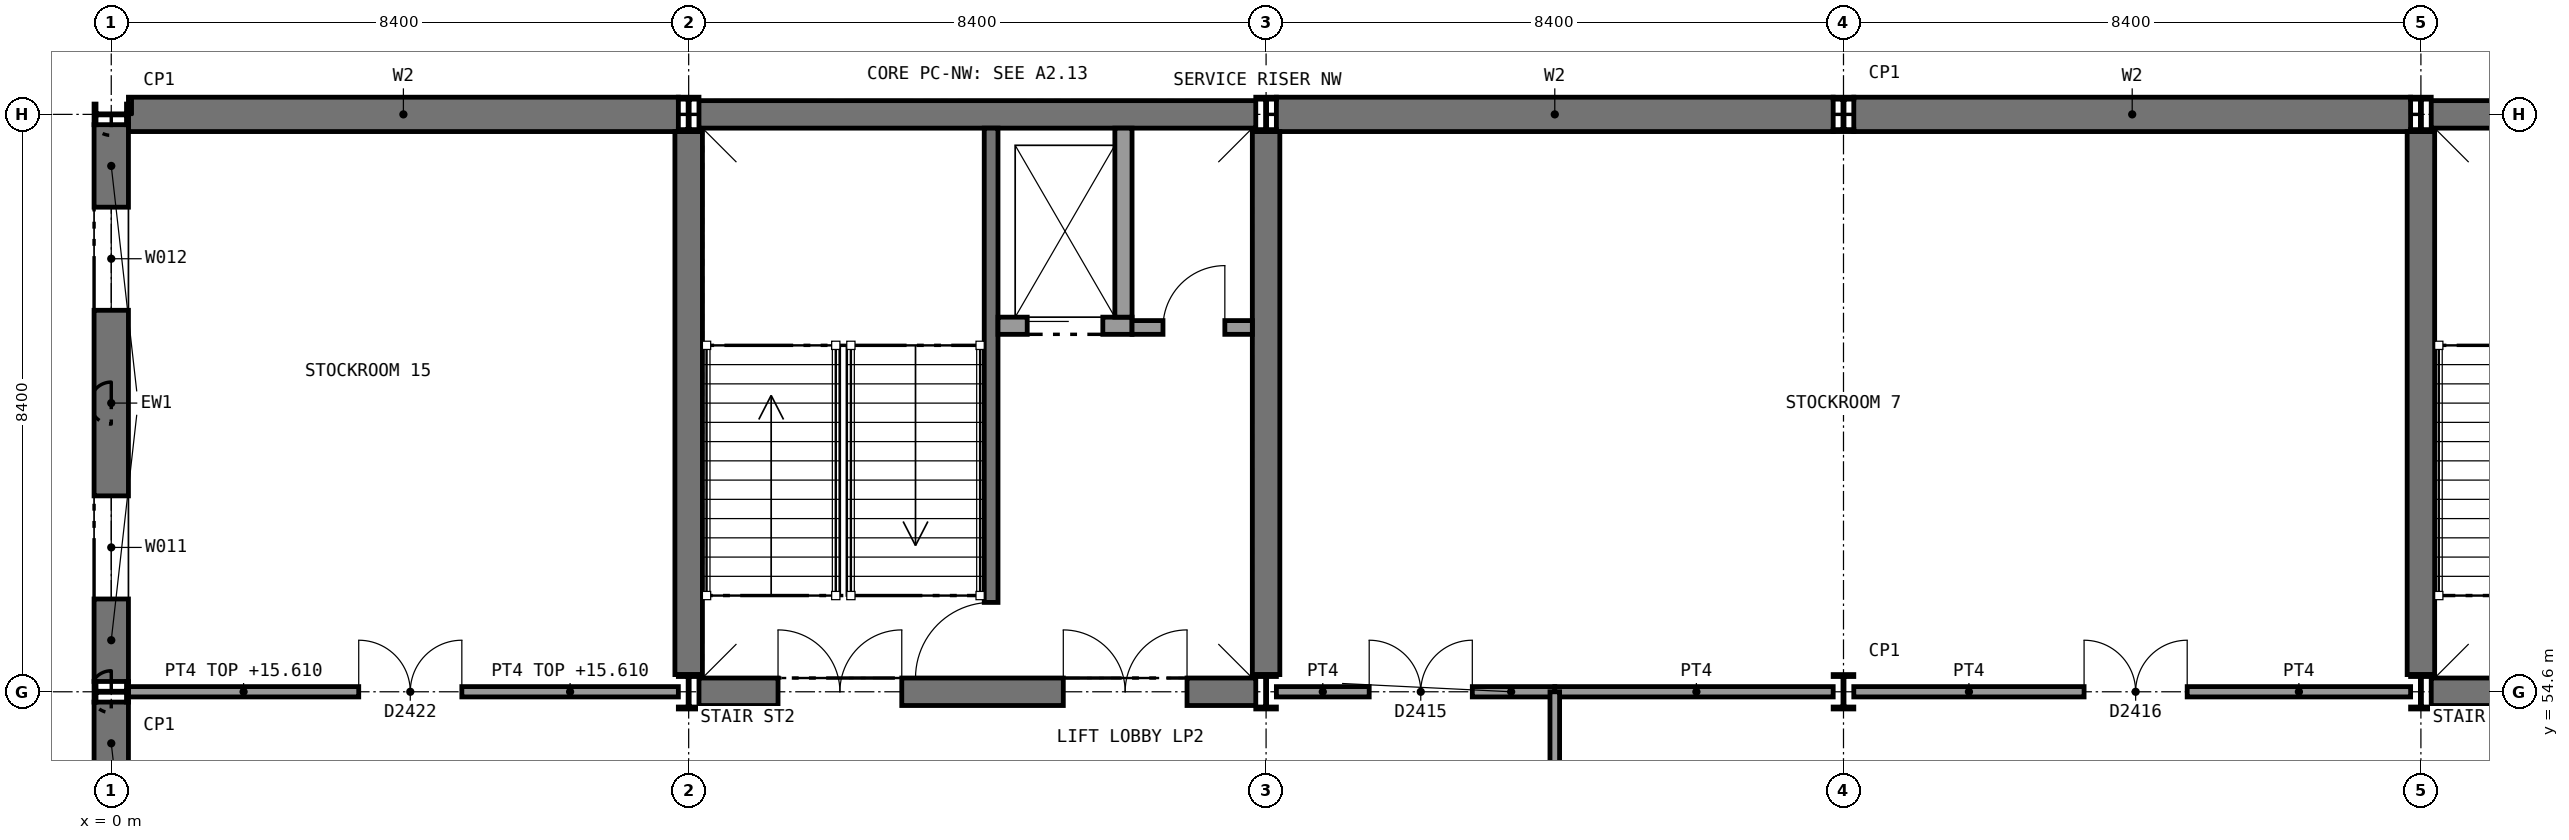
"""IFC4 building model, lengths in metres.
Left out: names, types, materials, properties, quantities, classifications, styles, units other than length and angle.
Written with IfcOpenShell. Run it as: python <this file> out.ifc"""

import sys

from ifc_helpers import new_model, si_unit, direction, frame, frame_2d, origin, origin_2d, place, context, subcontext, project, spatial, rectangle, i_section, extrude, element, fill, save


model = new_model("IFC4")
c1 = context("Model", 3, precision=1e-05, world=origin(), true_north=direction((0.0, 1.0)))
c2 = subcontext(c1, "Body", "Model", "MODEL_VIEW")
j1 = project(units=[si_unit("LENGTHUNIT", "METRE"), si_unit("PLANEANGLEUNIT", "RADIAN")], contexts=[c1])
p1 = place(None, origin())
s1 = spatial("IfcSite", under=j1, at=p1, CompositionType="ELEMENT")
p2 = place(p1, origin())
s2 = spatial("IfcBuilding", under=s1, at=p2, CompositionType="ELEMENT")
p3 = place(p2, frame((0.0, 0.0, 11.4)))
s3 = spatial("IfcBuildingStorey", under=s2, at=p3, CompositionType="ELEMENT", Elevation=11.4)
p4 = place(p3, frame((0.25, 63.0, 0.0), z_axis=(0.0, 0.0, 1.0), x_axis=(1.0, 0.0, 0.0)))
e1 = element("IfcWall", 1, at=p4, inside=s3, PredefinedType="SHEAR", context=c2, shape_type="SweptSolid", body=[
    extrude(rectangle(XDim=8.0, YDim=0.5, at=frame_2d((4.0, 0.0))), origin(), (0.0, 0.0, 1.0), 4.65),
])
p5 = place(p3, frame((16.95, 63.0, 0.0), z_axis=(0.0, 0.0, 1.0), x_axis=(1.0, 0.0, 0.0)))
e2 = element("IfcWall", 2, at=p5, inside=s3, PredefinedType="SHEAR", context=c2, shape_type="SweptSolid", body=[
    extrude(rectangle(XDim=8.1, YDim=0.5, at=frame_2d((4.05, 0.0))), origin(), (0.0, 0.0, 1.0), 4.65),
])
p6 = place(p3, frame((25.35, 63.0, 0.0), z_axis=(0.0, 0.0, 1.0), x_axis=(1.0, 0.0, 0.0)))
e3 = element("IfcWall", 3, at=p6, inside=s3, PredefinedType="SHEAR", context=c2, shape_type="SweptSolid", body=[
    extrude(rectangle(XDim=8.1, YDim=0.5, at=frame_2d((4.05, 0.0))), origin(), (0.0, 0.0, 1.0), 4.65),
])
p7 = place(p3, frame((8.55, 63.0, 0.0), z_axis=(0.0, 0.0, 1.0), x_axis=(1.0, 0.0, 0.0)))
e4 = element("IfcWall", 4, at=p7, inside=s3, PredefinedType="SHEAR", context=c2, shape_type="SweptSolid", body=[
    extrude(rectangle(XDim=8.1, YDim=0.4, at=frame_2d((4.05, 0.0))), origin(), (0.0, 0.0, 1.0), 4.65),
])
p8 = place(p3, frame((8.55, 54.6, 0.0), z_axis=(0.0, 0.0, 1.0), x_axis=(1.0, 0.0, 0.0)))
e5 = element("IfcWall", 5, at=p8, inside=s3, PredefinedType="SHEAR", context=c2, shape_type="SweptSolid", body=[
    extrude(rectangle(XDim=8.1, YDim=0.4, at=frame_2d((4.05, 0.0))), origin(), (0.0, 0.0, 1.0), 4.65),
])
p9 = place(p8, frame((1.15, 0.0, 0.0)))
e6 = element("IfcOpeningElement", 6, at=p9, cuts=e5, PredefinedType="OPENING", context=c2, shape_type="SweptSolid", body=[
    extrude(rectangle(XDim=1.8, YDim=2.1, at=frame_2d((0.9, 1.05))), frame((0.0, 0.21, 0.0), z_axis=(0.0, -1.0, 0.0), x_axis=(1.0, 0.0, 0.0)), (0.0, 0.0, 1.0), 0.42),
])
p10 = place(p8, frame((5.3, 0.0, 0.0)))
e7 = element("IfcOpeningElement", 7, at=p10, cuts=e5, PredefinedType="OPENING", context=c2, shape_type="SweptSolid", body=[
    extrude(rectangle(XDim=1.8, YDim=2.1, at=frame_2d((0.9, 1.05))), frame((0.0, 0.21, 0.0), z_axis=(0.0, -1.0, 0.0), x_axis=(1.0, 0.0, 0.0)), (0.0, 0.0, 1.0), 0.42),
])
for number, where, z_axis, x_axis in (
    (8, (8.4, 54.85, 0.0), (0.0, 0.0, 1.0), (0.0, 1.0, 0.0)),
    (9, (16.8, 54.85, 0.0), (0.0, 0.0, 1.0), (0.0, 1.0, 0.0)),
):
    element("IfcWall", number, at=place(p3, frame(where, z_axis=z_axis, x_axis=x_axis)), inside=s3, PredefinedType="SHEAR", context=c2, shape_type="SweptSolid", body=[
        extrude(rectangle(XDim=7.9, YDim=0.4, at=frame_2d((3.95, 0.0))), origin(), (0.0, 0.0, 1.0), 4.65),
    ])
p11 = place(p3, frame((33.75, 63.0, 0.0), z_axis=(0.0, 0.0, 1.0), x_axis=(1.0, 0.0, 0.0)))
e10 = element("IfcWall", 10, at=p11, inside=s3, PredefinedType="SHEAR", context=c2, shape_type="SweptSolid", body=[
    extrude(rectangle(XDim=8.1, YDim=0.4, at=frame_2d((4.05, 0.0))), origin(), (0.0, 0.0, 1.0), 4.65),
])
p12 = place(p3, frame((33.75, 54.6, 0.0), z_axis=(0.0, 0.0, 1.0), x_axis=(1.0, 0.0, 0.0)))
e11 = element("IfcWall", 11, at=p12, inside=s3, PredefinedType="SHEAR", context=c2, shape_type="SweptSolid", body=[
    extrude(rectangle(XDim=8.1, YDim=0.4, at=frame_2d((4.05, 0.0))), origin(), (0.0, 0.0, 1.0), 4.65),
])
p13 = place(p12, frame((1.15, 0.0, 0.0)))
e12 = element("IfcOpeningElement", 12, at=p13, cuts=e11, PredefinedType="OPENING", context=c2, shape_type="SweptSolid", body=[
    extrude(rectangle(XDim=1.8, YDim=2.1, at=frame_2d((0.9, 1.05))), frame((0.0, 0.21, 0.0), z_axis=(0.0, -1.0, 0.0), x_axis=(1.0, 0.0, 0.0)), (0.0, 0.0, 1.0), 0.42),
])
p14 = place(p12, frame((5.3, 0.0, 0.0)))
e13 = element("IfcOpeningElement", 13, at=p14, cuts=e11, PredefinedType="OPENING", context=c2, shape_type="SweptSolid", body=[
    extrude(rectangle(XDim=1.8, YDim=2.1, at=frame_2d((0.9, 1.05))), frame((0.0, 0.21, 0.0), z_axis=(0.0, -1.0, 0.0), x_axis=(1.0, 0.0, 0.0)), (0.0, 0.0, 1.0), 0.42),
])
p15 = place(p3, frame((33.6, 54.85, 0.0), z_axis=(0.0, 0.0, 1.0), x_axis=(0.0, 1.0, 0.0)))
e14 = element("IfcWall", 14, at=p15, inside=s3, PredefinedType="SHEAR", context=c2, shape_type="SweptSolid", body=[
    extrude(rectangle(XDim=7.9, YDim=0.4, at=frame_2d((3.95, 0.0))), origin(), (0.0, 0.0, 1.0), 4.65),
])
for number, where, z_axis, x_axis in (
    (15, (0.0, 54.6, 0.0), (0.0, 0.0, 1.0), (0.0, 1.0, 0.0)),
    (16, (0.0, 63.0, 0.0), (0.0, 0.0, 1.0), (0.0, 1.0, 0.0)),
    (17, (8.4, 54.6, 0.0), (0.0, 0.0, 1.0), (1.0, 0.0, 0.0)),
    (18, (8.4, 63.0, 0.0), (0.0, 0.0, 1.0), (1.0, 0.0, 0.0)),
    (19, (16.8, 54.6, 0.0), (0.0, 0.0, 1.0), (1.0, 0.0, 0.0)),
    (20, (16.8, 63.0, 0.0), (0.0, 0.0, 1.0), (1.0, 0.0, 0.0)),
    (21, (25.2, 54.6, 0.0), (0.0, 0.0, 1.0), (1.0, 0.0, 0.0)),
    (22, (25.2, 63.0, 0.0), (0.0, 0.0, 1.0), (1.0, 0.0, 0.0)),
    (23, (33.6, 54.6, 0.0), (0.0, 0.0, 1.0), (1.0, 0.0, 0.0)),
    (24, (33.6, 63.0, 0.0), (0.0, 0.0, 1.0), (1.0, 0.0, 0.0)),
):
    element("IfcColumn", number, at=place(p3, frame(where, z_axis=z_axis, x_axis=x_axis)), inside=s3, PredefinedType="COLUMN", context=c2, shape_type="SweptSolid", body=[
        extrude(i_section(OverallWidth=0.3, OverallDepth=0.5, WebThickness=0.014, FlangeThickness=0.028, FilletRadius=0.027, at=origin_2d()), origin(), (0.0, 0.0, 1.0), 4.8),
    ])
p16 = place(p3, frame((16.95, 54.6, 0.0), z_axis=(0.0, 0.0, 1.0), x_axis=(1.0, 0.0, 0.0)))
e25 = element("IfcWall", 25, at=p16, inside=s3, PredefinedType="SOLIDWALL", context=c2, shape_type="SweptSolid", body=[
    extrude(rectangle(XDim=4.05, YDim=0.15, at=frame_2d((2.025, 0.0))), origin(), (0.0, 0.0, 1.0), 4.32),
])
p17 = place(p16, frame((1.35, 0.0, 0.0)))
e26 = element("IfcOpeningElement", 26, at=p17, cuts=e25, PredefinedType="OPENING", context=c2, shape_type="SweptSolid", body=[
    extrude(rectangle(XDim=1.5, YDim=2.1, at=frame_2d((0.75, 1.05))), frame((0.0, 0.085, 0.0), z_axis=(0.0, -1.0, 0.0), x_axis=(1.0, 0.0, 0.0)), (0.0, 0.0, 1.0), 0.17),
])
p18 = place(p3, frame((21.0, 54.6, 0.0), z_axis=(0.0, 0.0, 1.0), x_axis=(1.0, 0.0, 0.0)))
e27 = element("IfcWall", 27, at=p18, inside=s3, PredefinedType="SOLIDWALL", context=c2, shape_type="SweptSolid", body=[
    extrude(rectangle(XDim=4.05, YDim=0.15, at=frame_2d((2.025, 0.0))), origin(), (0.0, 0.0, 1.0), 4.32),
])
p19 = place(p3, frame((25.35, 54.6, 0.0), z_axis=(0.0, 0.0, 1.0), x_axis=(1.0, 0.0, 0.0)))
e28 = element("IfcWall", 28, at=p19, inside=s3, PredefinedType="SOLIDWALL", context=c2, shape_type="SweptSolid", body=[
    extrude(rectangle(XDim=8.1, YDim=0.15, at=frame_2d((4.05, 0.0))), origin(), (0.0, 0.0, 1.0), 4.32),
])
p20 = place(p19, frame((3.35, 0.0, 0.0)))
e29 = element("IfcOpeningElement", 29, at=p20, cuts=e28, PredefinedType="OPENING", context=c2, shape_type="SweptSolid", body=[
    extrude(rectangle(XDim=1.5, YDim=2.1, at=frame_2d((0.75, 1.05))), frame((0.0, 0.085, 0.0), z_axis=(0.0, -1.0, 0.0), x_axis=(1.0, 0.0, 0.0)), (0.0, 0.0, 1.0), 0.17),
])
p21 = place(p3, frame((0.25, 54.6, 0.0), z_axis=(0.0, 0.0, 1.0), x_axis=(1.0, 0.0, 0.0)))
e30 = element("IfcWall", 30, at=p21, inside=s3, PredefinedType="SOLIDWALL", context=c2, shape_type="SweptSolid", body=[
    extrude(rectangle(XDim=8.0, YDim=0.15, at=frame_2d((4.0, 0.0))), origin(), (0.0, 0.0, 1.0), 4.21),
])
p22 = place(p21, frame((3.35, 0.0, 0.0)))
e31 = element("IfcOpeningElement", 31, at=p22, cuts=e30, PredefinedType="OPENING", context=c2, shape_type="SweptSolid", body=[
    extrude(rectangle(XDim=1.5, YDim=2.1, at=frame_2d((0.75, 1.05))), frame((0.0, 0.085, 0.0), z_axis=(0.0, -1.0, 0.0), x_axis=(1.0, 0.0, 0.0)), (0.0, 0.0, 1.0), 0.17),
])
p23 = place(p3, frame((21.0, 47.2, 0.0), z_axis=(0.0, 0.0, 1.0), x_axis=(0.0, 1.0, 0.0)))
e32 = element("IfcWall", 32, at=p23, inside=s3, PredefinedType="PARTITIONING", context=c2, shape_type="SweptSolid", body=[
    extrude(rectangle(XDim=7.4, YDim=0.14, at=frame_2d((3.7, 0.0))), origin(), (0.0, 0.0, 1.0), 4.65),
])
p24 = place(p3, frame((0.0, 46.35, 0.0), z_axis=(0.0, 0.0, 1.0), x_axis=(0.0, 1.0, 0.0)))
e33 = element("IfcWall", 33, at=p24, inside=s3, PredefinedType="STANDARD", context=c2, shape_type="SweptSolid", body=[
    extrude(rectangle(XDim=8.1, YDim=0.5, at=frame_2d((4.05, 0.0))), origin(), (0.0, 0.0, 1.0), 4.65),
])
p25 = place(p24, frame((1.2, 0.0, 0.9)))
e34 = element("IfcOpeningElement", 34, at=p25, cuts=e33, PredefinedType="OPENING", context=c2, shape_type="SweptSolid", body=[
    extrude(rectangle(XDim=1.5, YDim=3.0, at=frame_2d((0.75, 1.5))), frame((0.0, 0.26, 0.0), z_axis=(0.0, -1.0, 0.0), x_axis=(1.0, 0.0, 0.0)), (0.0, 0.0, 1.0), 0.52),
])
p26 = place(p24, frame((5.4, 0.0, 0.9)))
e35 = element("IfcOpeningElement", 35, at=p26, cuts=e33, PredefinedType="OPENING", context=c2, shape_type="SweptSolid", body=[
    extrude(rectangle(XDim=1.5, YDim=3.0, at=frame_2d((0.75, 1.5))), frame((0.0, 0.26, 0.0), z_axis=(0.0, -1.0, 0.0), x_axis=(1.0, 0.0, 0.0)), (0.0, 0.0, 1.0), 0.52),
])
p27 = place(p3, frame((0.0, 54.75, 0.0), z_axis=(0.0, 0.0, 1.0), x_axis=(0.0, 1.0, 0.0)))
e36 = element("IfcWall", 36, at=p27, inside=s3, PredefinedType="STANDARD", context=c2, shape_type="SweptSolid", body=[
    extrude(rectangle(XDim=8.1, YDim=0.5, at=frame_2d((4.05, 0.0))), origin(), (0.0, 0.0, 1.0), 4.65),
])
p28 = place(p27, frame((1.2, 0.0, 0.9)))
e37 = element("IfcOpeningElement", 37, at=p28, cuts=e36, PredefinedType="OPENING", context=c2, shape_type="SweptSolid", body=[
    extrude(rectangle(XDim=1.5, YDim=3.0, at=frame_2d((0.75, 1.5))), frame((0.0, 0.26, 0.0), z_axis=(0.0, -1.0, 0.0), x_axis=(1.0, 0.0, 0.0)), (0.0, 0.0, 1.0), 0.52),
])
p29 = place(p27, frame((5.4, 0.0, 0.9)))
e38 = element("IfcOpeningElement", 38, at=p29, cuts=e36, PredefinedType="OPENING", context=c2, shape_type="SweptSolid", body=[
    extrude(rectangle(XDim=1.5, YDim=3.0, at=frame_2d((0.75, 1.5))), frame((0.0, 0.26, 0.0), z_axis=(0.0, -1.0, 0.0), x_axis=(1.0, 0.0, 0.0)), (0.0, 0.0, 1.0), 0.52),
])
p30 = place(p3, frame((12.8, 62.8, 0.0), z_axis=(0.0, 0.0, 1.0), x_axis=(0.0, -1.0, 0.0)))
e39 = element("IfcWall", 39, at=p30, inside=s3, PredefinedType="SHEAR", context=c2, shape_type="SweptSolid", body=[
    extrude(rectangle(XDim=8.0, YDim=0.2, at=frame_2d((4.0, 0.0))), origin(), (0.0, 0.0, 1.0), 4.65),
])
p31 = place(p30, frame((6.9, 0.0, 0.0)))
e40 = element("IfcOpeningElement", 40, at=p31, cuts=e39, PredefinedType="OPENING", context=c2, shape_type="SweptSolid", body=[
    extrude(rectangle(XDim=1.11, YDim=2.1, at=frame_2d((0.555, 1.05))), frame((0.0, 0.11, 0.0), z_axis=(0.0, -1.0, 0.0), x_axis=(1.0, 0.0, 0.0)), (0.0, 0.0, 1.0), 0.22),
])
p32 = place(p3, frame((12.9, 59.925, 0.0), z_axis=(0.0, 0.0, 1.0), x_axis=(1.0, 0.0, 0.0)))
e41 = element("IfcWall", 41, at=p32, inside=s3, PredefinedType="SOLIDWALL", context=c2, shape_type="SweptSolid", body=[
    extrude(rectangle(XDim=1.95, YDim=0.25, at=frame_2d((0.975, 0.0))), origin(), (0.0, 0.0, 1.0), 4.8),
])
p33 = place(p32, frame((0.425, 0.0, 0.0)))
e42 = element("IfcOpeningElement", 42, at=p33, cuts=e41, PredefinedType="OPENING", context=c2, shape_type="SweptSolid", body=[
    extrude(rectangle(XDim=1.1, YDim=2.1, at=frame_2d((0.55, 1.05))), frame((0.0, 0.135, 0.0), z_axis=(0.0, -1.0, 0.0), x_axis=(1.0, 0.0, 0.0)), (0.0, 0.0, 1.0), 0.27),
])
p34 = place(p3, frame((14.725, 62.8, 0.0), z_axis=(0.0, 0.0, 1.0), x_axis=(0.0, -1.0, 0.0)))
e43 = element("IfcWall", 43, at=p34, inside=s3, PredefinedType="SOLIDWALL", context=c2, shape_type="SweptSolid", body=[
    extrude(rectangle(XDim=2.75, YDim=0.25, at=frame_2d((1.375, 0.0))), origin(), (0.0, 0.0, 1.0), 4.8),
])
p35 = place(p3, frame((14.85, 59.9, 0.0), z_axis=(0.0, 0.0, 1.0), x_axis=(1.0, 0.0, 0.0)))
e44 = element("IfcWall", 44, at=p35, inside=s3, PredefinedType="PARTITIONING", context=c2, shape_type="SweptSolid", body=[
    extrude(rectangle(XDim=1.75, YDim=0.2, at=frame_2d((0.875, 0.0))), origin(), (0.0, 0.0, 1.0), 4.65),
])
p36 = place(p35, frame((0.45, 0.0, 0.0)))
e45 = element("IfcOpeningElement", 45, at=p36, cuts=e44, PredefinedType="OPENING", context=c2, shape_type="SweptSolid", body=[
    extrude(rectangle(XDim=0.9, YDim=2.1, at=frame_2d((0.45, 1.05))), frame((0.0, 0.11, 0.0), z_axis=(0.0, -1.0, 0.0), x_axis=(1.0, 0.0, 0.0)), (0.0, 0.0, 1.0), 0.22),
])
p37 = place(p17, origin())
e46 = element("IfcDoor", 46, at=p37, inside=s3, OperationType="DOUBLE_DOOR_SINGLE_SWING", PredefinedType="DOOR", context=c2, shape_type="SweptSolid", body=[
    extrude(rectangle(XDim=1.5, YDim=2.1, at=frame_2d((0.75, 1.05))), frame((0.0, 0.025, 0.0), z_axis=(0.0, -1.0, 0.0), x_axis=(1.0, 0.0, 0.0)), (0.0, 0.0, 1.0), 0.05),
])
fill(e26, e46)
p38 = place(p20, origin())
e47 = element("IfcDoor", 47, at=p38, inside=s3, OperationType="DOUBLE_DOOR_SINGLE_SWING", PredefinedType="DOOR", context=c2, shape_type="SweptSolid", body=[
    extrude(rectangle(XDim=1.5, YDim=2.1, at=frame_2d((0.75, 1.05))), frame((0.0, 0.025, 0.0), z_axis=(0.0, -1.0, 0.0), x_axis=(1.0, 0.0, 0.0)), (0.0, 0.0, 1.0), 0.05),
])
fill(e29, e47)
p39 = place(p22, origin())
e48 = element("IfcDoor", 48, at=p39, inside=s3, OperationType="DOUBLE_DOOR_SINGLE_SWING", PredefinedType="DOOR", context=c2, shape_type="SweptSolid", body=[
    extrude(rectangle(XDim=1.5, YDim=2.1, at=frame_2d((0.75, 1.05))), frame((0.0, 0.025, 0.0), z_axis=(0.0, -1.0, 0.0), x_axis=(1.0, 0.0, 0.0)), (0.0, 0.0, 1.0), 0.05),
])
fill(e31, e48)
p40 = place(p28, origin())
e49 = element("IfcWindow", 49, at=p40, inside=s3, PartitioningType="SINGLE_PANEL", PredefinedType="WINDOW", context=c2, shape_type="SweptSolid", body=[
    extrude(rectangle(XDim=1.5, YDim=3.0, at=frame_2d((0.75, 1.5))), frame((0.0, 0.03, 0.0), z_axis=(0.0, -1.0, 0.0), x_axis=(1.0, 0.0, 0.0)), (0.0, 0.0, 1.0), 0.06),
])
fill(e37, e49)
p41 = place(p29, origin())
e50 = element("IfcWindow", 50, at=p41, inside=s3, PartitioningType="SINGLE_PANEL", PredefinedType="WINDOW", context=c2, shape_type="SweptSolid", body=[
    extrude(rectangle(XDim=1.5, YDim=3.0, at=frame_2d((0.75, 1.5))), frame((0.0, 0.03, 0.0), z_axis=(0.0, -1.0, 0.0), x_axis=(1.0, 0.0, 0.0)), (0.0, 0.0, 1.0), 0.06),
])
fill(e38, e50)
p42 = place(p31, frame((1.1, 0.0, 0.0), z_axis=(0.0, 0.0, 1.0), x_axis=(-1.0, 0.0, 0.0)))
e51 = element("IfcDoor", 51, at=p42, inside=s3, OperationType="SINGLE_SWING_LEFT", PredefinedType="DOOR", context=c2, shape_type="SweptSolid", body=[
    extrude(rectangle(XDim=1.1, YDim=2.1, at=frame_2d((0.55, 1.05))), frame((0.0, 0.025, 0.0), z_axis=(0.0, -1.0, 0.0), x_axis=(1.0, 0.0, 0.0)), (0.0, 0.0, 1.0), 0.05),
])
fill(e40, e51)
p43 = place(p33, frame((1.1, 0.0, 0.0), z_axis=(0.0, 0.0, 1.0), x_axis=(-1.0, 0.0, 0.0)))
e52 = element("IfcDoor", 52, at=p43, inside=s3, OperationType="SLIDING_TO_RIGHT", PredefinedType="DOOR", context=c2, shape_type="SweptSolid", body=[
    extrude(rectangle(XDim=1.1, YDim=2.1, at=frame_2d((0.55, 1.05))), frame((0.0, 0.025, 0.0), z_axis=(0.0, -1.0, 0.0), x_axis=(1.0, 0.0, 0.0)), (0.0, 0.0, 1.0), 0.05),
])
fill(e42, e52)
p44 = place(p36, origin())
e53 = element("IfcDoor", 53, at=p44, inside=s3, OperationType="SINGLE_SWING_RIGHT", PredefinedType="DOOR", context=c2, shape_type="SweptSolid", body=[
    extrude(rectangle(XDim=0.9, YDim=2.1, at=frame_2d((0.45, 1.05))), frame((0.0, 0.025, 0.0), z_axis=(0.0, -1.0, 0.0), x_axis=(1.0, 0.0, 0.0)), (0.0, 0.0, 1.0), 0.05),
])
fill(e45, e53)
p45 = place(p9, origin())
e54 = element("IfcDoor", 54, at=p45, inside=s3, OperationType="DOUBLE_DOOR_SINGLE_SWING", PredefinedType="DOOR", context=c2, shape_type="SweptSolid", body=[
    extrude(rectangle(XDim=1.8, YDim=2.1, at=frame_2d((0.9, 1.05))), frame((0.0, 0.025, 0.0), z_axis=(0.0, -1.0, 0.0), x_axis=(1.0, 0.0, 0.0)), (0.0, 0.0, 1.0), 0.05),
])
fill(e6, e54)
p46 = place(p10, origin())
e55 = element("IfcDoor", 55, at=p46, inside=s3, OperationType="DOUBLE_DOOR_SINGLE_SWING", PredefinedType="DOOR", context=c2, shape_type="SweptSolid", body=[
    extrude(rectangle(XDim=1.8, YDim=2.1, at=frame_2d((0.9, 1.05))), frame((0.0, 0.025, 0.0), z_axis=(0.0, -1.0, 0.0), x_axis=(1.0, 0.0, 0.0)), (0.0, 0.0, 1.0), 0.05),
])
fill(e7, e55)
save(model, sys.argv[1])
